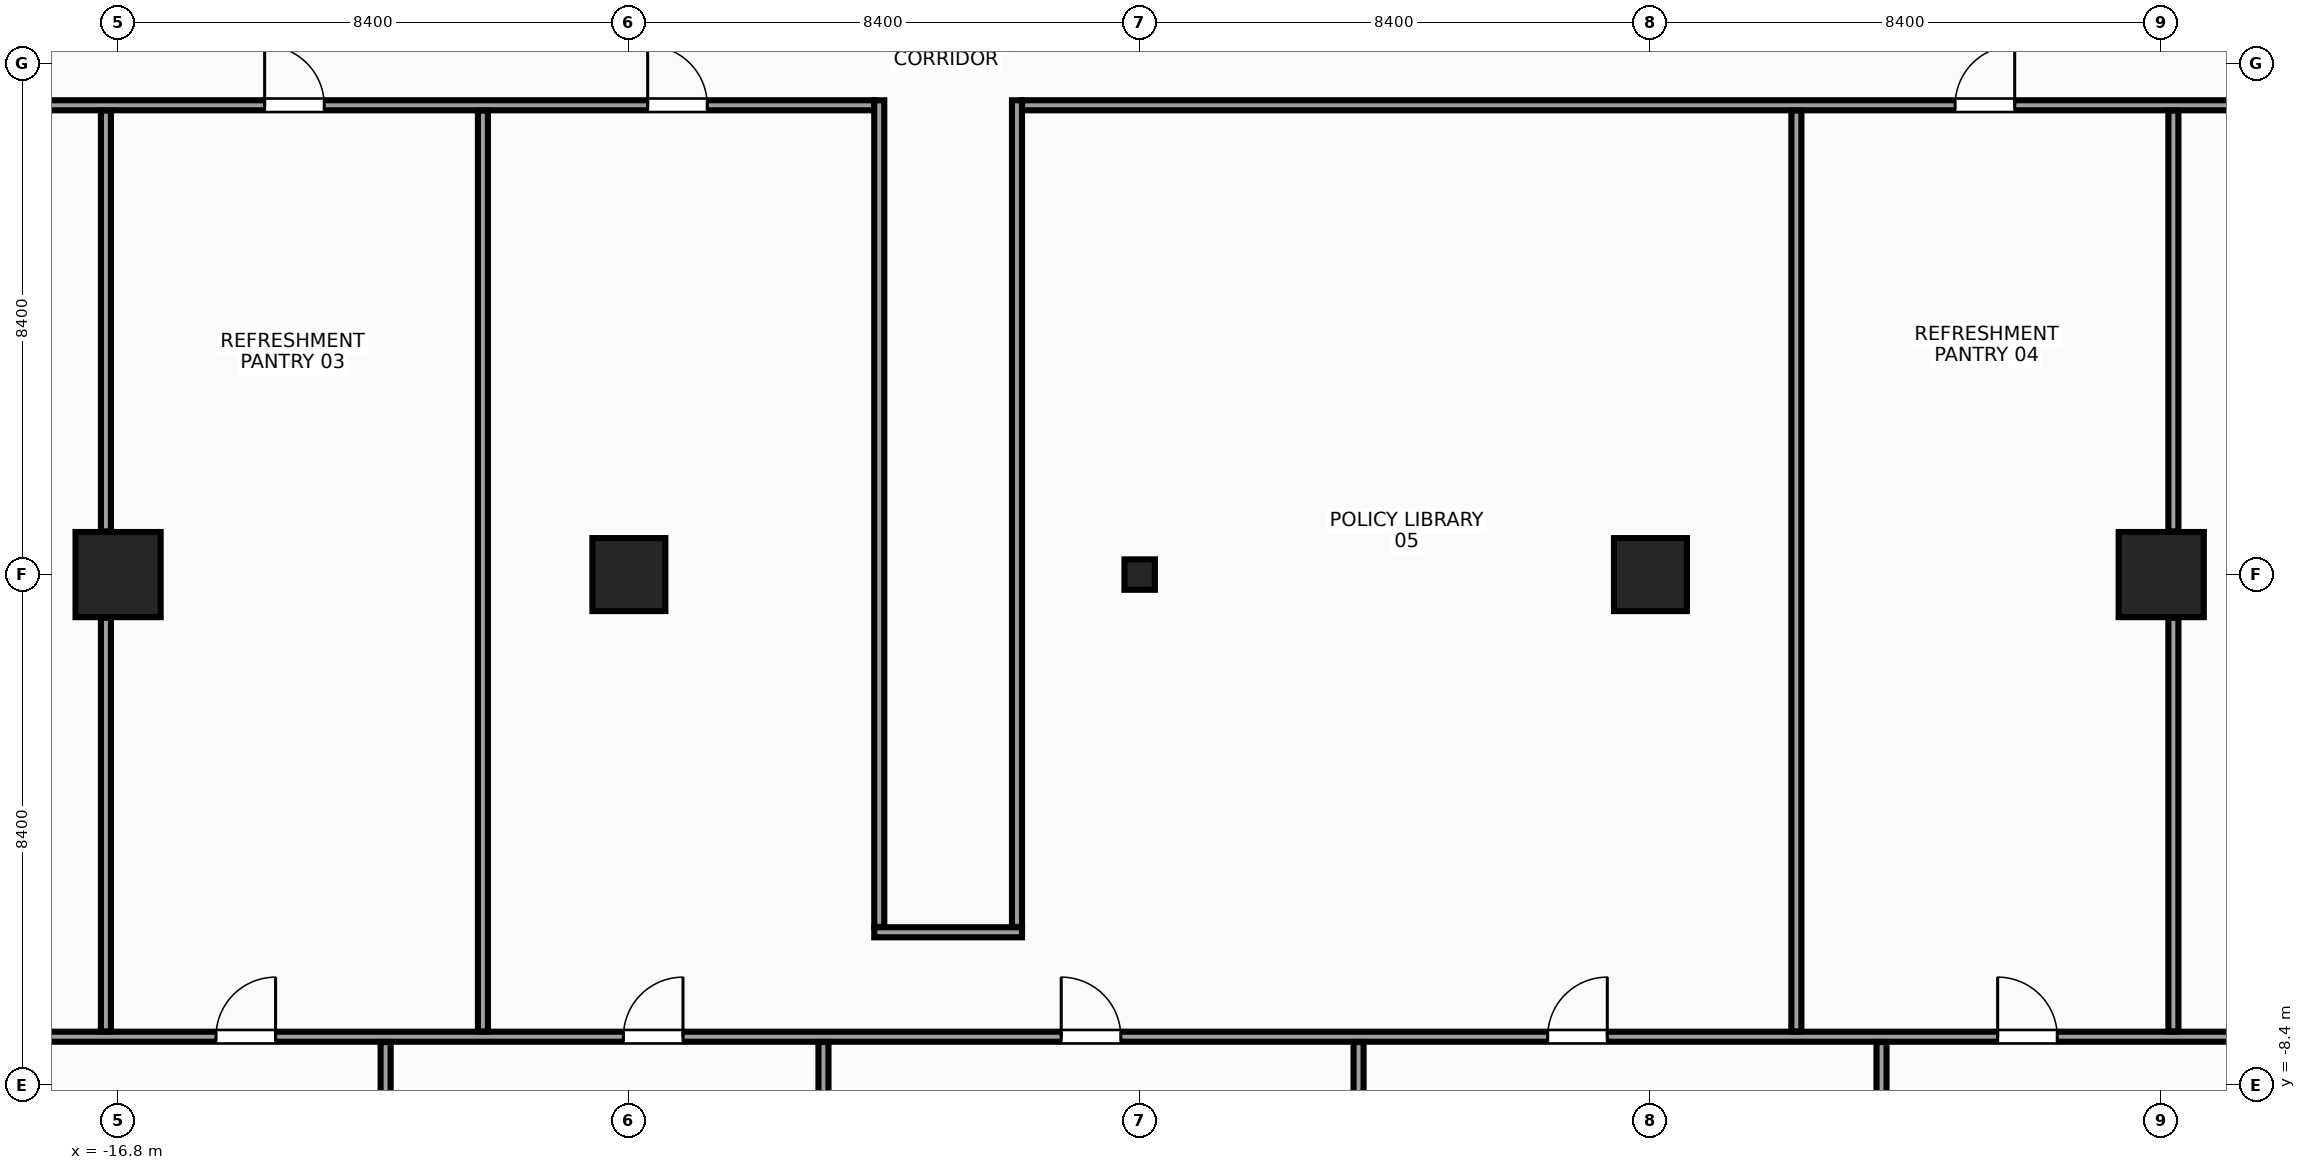
"""IFC4 building model, lengths in metres.
Left out: names, types, materials, properties, quantities, classifications, styles, units other than length and angle.
Written with IfcOpenShell. Run it as: python <this file> out.ifc"""

import sys

from ifc_helpers import new_model, si_unit, direction, frame, frame_2d, origin, origin_with_axes, origin_2d, place, context, subcontext, project, spatial, rectangle, hollow_rectangle, extrude, source, transform, mapped, element, fill, save


model = new_model("IFC4")
c1 = context("Model", 3, precision=1e-05, world=origin(), true_north=direction((0.0, 1.0)))
c2 = subcontext(c1, "Body", "Model", "MODEL_VIEW")
j1 = project(units=[si_unit("LENGTHUNIT", "METRE"), si_unit("PLANEANGLEUNIT", "RADIAN")], contexts=[c1])
p1 = place(None, origin())
s1 = spatial("IfcSite", under=j1, at=p1, CompositionType="ELEMENT")
p2 = place(p1, origin())
s2 = spatial("IfcBuilding", under=s1, at=p2, CompositionType="ELEMENT")
p3 = place(p2, frame((0.0, 0.0, 261.2)))
s3 = spatial("IfcBuildingStorey", under=s2, at=p3, CompositionType="ELEMENT", Elevation=261.2)
m1 = source(origin(), c2, "Body", "SweptSolid", [
    extrude(rectangle(XDim=1.4, YDim=1.4, at=origin_2d()), origin(), (0.0, 0.0, 1.0), 3.6),
])
for number, where, z_axis, x_axis in (
    (1, (-16.8, 0.0, 0.0), (0.0, 0.0, 1.0), (1.0, 0.0, 0.0)),
    (2, (16.8, 0.0, 0.0), (0.0, 0.0, 1.0), (1.0, 0.0, 0.0)),
):
    element("IfcColumn", number, at=place(p3, frame(where, z_axis=z_axis, x_axis=x_axis)), inside=s3, PredefinedType="COLUMN", context=c2, shape_type="MappedRepresentation", body=[
        mapped(m1, transform((0.0, 0.0, 0.0), x_axis=(1.0, 0.0, 0.0), y_axis=(0.0, 1.0, 0.0), z_axis=(0.0, 0.0, 1.0), scale=1.0)),
    ])
m2 = source(origin(), c2, "Body", "SweptSolid", [
    extrude(rectangle(XDim=1.2, YDim=1.2, at=origin_2d()), origin(), (0.0, 0.0, 1.0), 3.6),
])
for number, where, z_axis, x_axis in (
    (3, (-8.4, 0.0, 0.0), (0.0, 0.0, 1.0), (1.0, 0.0, 0.0)),
    (4, (8.4, 0.0, 0.0), (0.0, 0.0, 1.0), (1.0, 0.0, 0.0)),
):
    element("IfcColumn", number, at=place(p3, frame(where, z_axis=z_axis, x_axis=x_axis)), inside=s3, PredefinedType="COLUMN", context=c2, shape_type="MappedRepresentation", body=[
        mapped(m2, transform((0.0, 0.0, 0.0), x_axis=(1.0, 0.0, 0.0), y_axis=(0.0, 1.0, 0.0), z_axis=(0.0, 0.0, 1.0), scale=1.0)),
    ])
m3 = source(origin(), c2, "Body", "SweptSolid", [
    extrude(hollow_rectangle(XDim=0.5, YDim=0.5, WallThickness=0.025, at=origin_2d()), origin(), (0.0, 0.0, 1.0), 3.6),
])
p4 = place(p3, origin_with_axes())
e5 = element("IfcColumn", 5, at=p4, inside=s3, PredefinedType="COLUMN", context=c2, shape_type="MappedRepresentation", body=[
    mapped(m3, transform((0.0, 0.0, 0.0), x_axis=(1.0, 0.0, 0.0), y_axis=(0.0, 1.0, 0.0), z_axis=(0.0, 0.0, 1.0), scale=1.0)),
])
m4 = source(origin(), c2, "Body", "SweptSolid", [
    extrude(rectangle(XDim=15.6, YDim=0.165, at=frame_2d((7.8, 0.0))), origin(), (0.0, 0.0, 1.0), 2.755),
])
p5 = place(p3, frame((-19.965, 7.718, 0.0), z_axis=(0.0, 0.0, 1.0), x_axis=(1.0, 0.0, 0.0)))
e6 = element("IfcWall", 6, at=p5, inside=s3, PredefinedType="PARTITIONING", context=c2, shape_type="MappedRepresentation", body=[
    mapped(m4, transform((0.0, 0.0, 0.0), x_axis=(1.0, 0.0, 0.0), y_axis=(0.0, 1.0, 0.0), z_axis=(0.0, 0.0, 1.0), scale=1.0)),
])
p6 = place(p5, frame((1.014, 0.0, 0.0)))
e7 = element("IfcOpeningElement", 7, at=p6, cuts=e6, PredefinedType="OPENING", context=c2, shape_type="SweptSolid", body=[
    extrude(rectangle(XDim=0.98, YDim=2.15, at=frame_2d((0.49, 1.075))), frame((0.0, 0.094, 0.0), z_axis=(0.0, -1.0, 0.0), x_axis=(1.0, 0.0, 0.0)), (0.0, 0.0, 1.0), 0.189),
])
p7 = place(p5, frame((5.575, 0.0, 0.0)))
e8 = element("IfcOpeningElement", 8, at=p7, cuts=e6, PredefinedType="OPENING", context=c2, shape_type="SweptSolid", body=[
    extrude(rectangle(XDim=0.98, YDim=2.15, at=frame_2d((0.49, 1.075))), frame((0.0, 0.094, 0.0), z_axis=(0.0, -1.0, 0.0), x_axis=(1.0, 0.0, 0.0)), (0.0, 0.0, 1.0), 0.189),
])
p8 = place(p5, frame((11.874, 0.0, 0.0)))
e9 = element("IfcOpeningElement", 9, at=p8, cuts=e6, PredefinedType="OPENING", context=c2, shape_type="SweptSolid", body=[
    extrude(rectangle(XDim=0.98, YDim=2.15, at=frame_2d((0.49, 1.075))), frame((0.0, 0.094, 0.0), z_axis=(0.0, -1.0, 0.0), x_axis=(1.0, 0.0, 0.0)), (0.0, 0.0, 1.0), 0.189),
])
m5 = source(origin(), c2, "Body", "SweptSolid", [
    extrude(rectangle(XDim=21.9, YDim=0.165, at=frame_2d((10.95, 0.0))), origin(), (0.0, 0.0, 1.0), 2.755),
])
p9 = place(p3, frame((-1.935, 7.718, 0.0), z_axis=(0.0, 0.0, 1.0), x_axis=(1.0, 0.0, 0.0)))
e10 = element("IfcWall", 10, at=p9, inside=s3, PredefinedType="PARTITIONING", context=c2, shape_type="MappedRepresentation", body=[
    mapped(m5, transform((0.0, 0.0, 0.0), x_axis=(1.0, 0.0, 0.0), y_axis=(0.0, 1.0, 0.0), z_axis=(0.0, 0.0, 1.0), scale=1.0)),
])
p10 = place(p9, frame((19.906, 0.0, 0.0)))
e11 = element("IfcOpeningElement", 11, at=p10, cuts=e10, PredefinedType="OPENING", context=c2, shape_type="SweptSolid", body=[
    extrude(rectangle(XDim=0.98, YDim=2.15, at=frame_2d((0.49, 1.075))), frame((0.0, 0.094, 0.0), z_axis=(0.0, -1.0, 0.0), x_axis=(1.0, 0.0, 0.0)), (0.0, 0.0, 1.0), 0.189),
])
p11 = place(p9, frame((15.345, 0.0, 0.0)))
e12 = element("IfcOpeningElement", 12, at=p11, cuts=e10, PredefinedType="OPENING", context=c2, shape_type="SweptSolid", body=[
    extrude(rectangle(XDim=0.98, YDim=2.15, at=frame_2d((0.49, 1.075))), frame((0.0, 0.094, 0.0), z_axis=(0.0, -1.0, 0.0), x_axis=(1.0, 0.0, 0.0)), (0.0, 0.0, 1.0), 0.189),
])
m6 = source(origin(), c2, "Body", "SweptSolid", [
    extrude(rectangle(XDim=2.43, YDim=0.165, at=frame_2d((1.215, 0.0))), origin(), (0.0, 0.0, 1.0), 3.37),
])
p12 = place(p3, frame((-4.365, -5.883, 0.0), z_axis=(0.0, 0.0, 1.0), x_axis=(1.0, 0.0, 0.0)))
e13 = element("IfcWall", 13, at=p12, inside=s3, PredefinedType="PARTITIONING", context=c2, shape_type="MappedRepresentation", body=[
    mapped(m6, transform((0.0, 0.0, 0.0), x_axis=(1.0, 0.0, 0.0), y_axis=(0.0, 1.0, 0.0), z_axis=(0.0, 0.0, 1.0), scale=1.0)),
])
m7 = source(origin(), c2, "Body", "SweptSolid", [
    extrude(rectangle(XDim=13.595, YDim=0.165, at=frame_2d((6.797, 0.0))), origin(), (0.0, 0.0, 1.0), 2.655),
])
for number, where, z_axis, x_axis in (
    (14, (-4.282, -5.795, 0.0), (0.0, 0.0, 1.0), (0.0, 1.0, 0.0)),
    (15, (-2.018, -5.795, 0.0), (0.0, 0.0, 1.0), (0.0, 1.0, 0.0)),
):
    element("IfcWall", number, at=place(p3, frame(where, z_axis=z_axis, x_axis=x_axis)), inside=s3, PredefinedType="PARTITIONING", context=c2, shape_type="MappedRepresentation", body=[
        mapped(m7, transform((0.0, 0.0, 0.0), x_axis=(1.0, 0.0, 0.0), y_axis=(0.0, 1.0, 0.0), z_axis=(0.0, 0.0, 1.0), scale=1.0)),
    ])
m8 = source(origin(), c2, "Body", "SweptSolid", [
    extrude(rectangle(XDim=36.824, YDim=0.165, at=frame_2d((18.412, 0.0))), origin(), (0.0, 0.0, 1.0), 2.755),
])
p13 = place(p3, frame((-18.412, -7.6, 0.0), z_axis=(0.0, 0.0, 1.0), x_axis=(1.0, 0.0, 0.0)))
e16 = element("IfcWall", 16, at=p13, inside=s3, PredefinedType="PARTITIONING", context=c2, shape_type="MappedRepresentation", body=[
    mapped(m8, transform((0.0, 0.0, 0.0), x_axis=(1.0, 0.0, 0.0), y_axis=(0.0, 1.0, 0.0), z_axis=(0.0, 0.0, 1.0), scale=1.0)),
])
p14 = place(p13, frame((3.222, 0.0, 0.0)))
e17 = element("IfcOpeningElement", 17, at=p14, cuts=e16, PredefinedType="OPENING", context=c2, shape_type="SweptSolid", body=[
    extrude(rectangle(XDim=0.98, YDim=2.15, at=frame_2d((0.49, 1.075))), frame((0.0, 0.094, 0.0), z_axis=(0.0, -1.0, 0.0), x_axis=(1.0, 0.0, 0.0)), (0.0, 0.0, 1.0), 0.189),
])
p15 = place(p13, frame((32.522, 0.0, 0.0)))
e18 = element("IfcOpeningElement", 18, at=p15, cuts=e16, PredefinedType="OPENING", context=c2, shape_type="SweptSolid", body=[
    extrude(rectangle(XDim=0.98, YDim=2.15, at=frame_2d((0.49, 1.075))), frame((0.0, 0.094, 0.0), z_axis=(0.0, -1.0, 0.0), x_axis=(1.0, 0.0, 0.0)), (0.0, 0.0, 1.0), 0.189),
])
p16 = place(p13, frame((9.922, 0.0, 0.0)))
e19 = element("IfcOpeningElement", 19, at=p16, cuts=e16, PredefinedType="OPENING", context=c2, shape_type="SweptSolid", body=[
    extrude(rectangle(XDim=0.98, YDim=2.15, at=frame_2d((0.49, 1.075))), frame((0.0, 0.094, 0.0), z_axis=(0.0, -1.0, 0.0), x_axis=(1.0, 0.0, 0.0)), (0.0, 0.0, 1.0), 0.189),
])
p17 = place(p13, frame((17.122, 0.0, 0.0)))
e20 = element("IfcOpeningElement", 20, at=p17, cuts=e16, PredefinedType="OPENING", context=c2, shape_type="SweptSolid", body=[
    extrude(rectangle(XDim=0.98, YDim=2.15, at=frame_2d((0.49, 1.075))), frame((0.0, 0.094, 0.0), z_axis=(0.0, -1.0, 0.0), x_axis=(1.0, 0.0, 0.0)), (0.0, 0.0, 1.0), 0.189),
])
p18 = place(p13, frame((25.122, 0.0, 0.0)))
e21 = element("IfcOpeningElement", 21, at=p18, cuts=e16, PredefinedType="OPENING", context=c2, shape_type="SweptSolid", body=[
    extrude(rectangle(XDim=0.98, YDim=2.15, at=frame_2d((0.49, 1.075))), frame((0.0, 0.094, 0.0), z_axis=(0.0, -1.0, 0.0), x_axis=(1.0, 0.0, 0.0)), (0.0, 0.0, 1.0), 0.189),
])
m9 = source(origin(), c2, "Body", "SweptSolid", [
    extrude(rectangle(XDim=6.802, YDim=0.165, at=frame_2d((3.401, 0.0))), origin(), (0.0, 0.0, 1.0), 2.755),
])
p19 = place(p3, frame((-17.0, -7.512, 0.0), z_axis=(0.0, 0.0, 1.0), x_axis=(0.0, 1.0, 0.0)))
e22 = element("IfcWall", 22, at=p19, inside=s3, PredefinedType="PARTITIONING", context=c2, shape_type="MappedRepresentation", body=[
    mapped(m9, transform((0.0, 0.0, 0.0), x_axis=(1.0, 0.0, 0.0), y_axis=(0.0, 1.0, 0.0), z_axis=(0.0, 0.0, 1.0), scale=1.0)),
])
m10 = source(origin(), c2, "Body", "SweptSolid", [
    extrude(rectangle(XDim=6.92, YDim=0.165, at=frame_2d((3.46, 0.0))), origin(), (0.0, 0.0, 1.0), 2.755),
])
p20 = place(p3, frame((-17.0, 0.71, 0.0), z_axis=(0.0, 0.0, 1.0), x_axis=(0.0, 1.0, 0.0)))
e23 = element("IfcWall", 23, at=p20, inside=s3, PredefinedType="PARTITIONING", context=c2, shape_type="MappedRepresentation", body=[
    mapped(m10, transform((0.0, 0.0, 0.0), x_axis=(1.0, 0.0, 0.0), y_axis=(0.0, 1.0, 0.0), z_axis=(0.0, 0.0, 1.0), scale=1.0)),
])
m11 = source(origin(), c2, "Body", "SweptSolid", [
    extrude(rectangle(XDim=15.142, YDim=0.165, at=frame_2d((7.571, 0.0))), origin(), (0.0, 0.0, 1.0), 2.655),
])
for number, where, z_axis, x_axis in (
    (24, (-10.8, -7.512, 0.0), (0.0, 0.0, 1.0), (0.0, 1.0, 0.0)),
    (25, (10.8, -7.512, 0.0), (0.0, 0.0, 1.0), (0.0, 1.0, 0.0)),
):
    element("IfcWall", number, at=place(p3, frame(where, z_axis=z_axis, x_axis=x_axis)), inside=s3, PredefinedType="PARTITIONING", context=c2, shape_type="MappedRepresentation", body=[
        mapped(m11, transform((0.0, 0.0, 0.0), x_axis=(1.0, 0.0, 0.0), y_axis=(0.0, 1.0, 0.0), z_axis=(0.0, 0.0, 1.0), scale=1.0)),
    ])
p21 = place(p3, frame((17.0, -7.512, 0.0), z_axis=(0.0, 0.0, 1.0), x_axis=(0.0, 1.0, 0.0)))
e26 = element("IfcWall", 26, at=p21, inside=s3, PredefinedType="PARTITIONING", context=c2, shape_type="MappedRepresentation", body=[
    mapped(m9, transform((0.0, 0.0, 0.0), x_axis=(1.0, 0.0, 0.0), y_axis=(0.0, 1.0, 0.0), z_axis=(0.0, 0.0, 1.0), scale=1.0)),
])
p22 = place(p3, frame((17.0, 0.71, 0.0), z_axis=(0.0, 0.0, 1.0), x_axis=(0.0, 1.0, 0.0)))
e27 = element("IfcWall", 27, at=p22, inside=s3, PredefinedType="PARTITIONING", context=c2, shape_type="MappedRepresentation", body=[
    mapped(m10, transform((0.0, 0.0, 0.0), x_axis=(1.0, 0.0, 0.0), y_axis=(0.0, 1.0, 0.0), z_axis=(0.0, 0.0, 1.0), scale=1.0)),
])
m12 = source(origin(), c2, "Body", "SweptSolid", [
    extrude(rectangle(XDim=4.163, YDim=0.165, at=frame_2d((2.081, 0.0))), origin(), (0.0, 0.0, 1.0), 2.905),
])
for number, where, z_axis, x_axis in (
    (28, (-12.4, -11.85, 0.0), (0.0, 0.0, 1.0), (0.0, 1.0, 0.0)),
    (29, (-5.2, -11.85, 0.0), (0.0, 0.0, 1.0), (0.0, 1.0, 0.0)),
    (30, (3.6, -11.85, 0.0), (0.0, 0.0, 1.0), (0.0, 1.0, 0.0)),
    (31, (12.2, -11.85, 0.0), (0.0, 0.0, 1.0), (0.0, 1.0, 0.0)),
):
    element("IfcWall", number, at=place(p3, frame(where, z_axis=z_axis, x_axis=x_axis)), inside=s3, PredefinedType="PARTITIONING", context=c2, shape_type="MappedRepresentation", body=[
        mapped(m12, transform((0.0, 0.0, 0.0), x_axis=(1.0, 0.0, 0.0), y_axis=(0.0, 1.0, 0.0), z_axis=(0.0, 0.0, 1.0), scale=1.0)),
    ])
m13 = source(origin(), c2, "Body", "SweptSolid", [
    extrude(rectangle(XDim=0.98, YDim=2.15, at=frame_2d((0.49, 1.075))), frame((0.0, 0.025, 0.0), z_axis=(0.0, -1.0, 0.0), x_axis=(1.0, 0.0, 0.0)), (0.0, 0.0, 1.0), 0.05),
])
p23 = place(p7, origin())
e32 = element("IfcDoor", 32, at=p23, inside=s3, OperationType="SINGLE_SWING_LEFT", PredefinedType="DOOR", context=c2, shape_type="MappedRepresentation", body=[
    mapped(m13, transform((0.0, 0.0, 0.0), x_axis=(1.0, 0.0, 0.0), y_axis=(0.0, 1.0, 0.0), z_axis=(0.0, 0.0, 1.0), scale=1.0)),
])
fill(e8, e32)
p24 = place(p11, origin())
e33 = element("IfcDoor", 33, at=p24, inside=s3, OperationType="SINGLE_SWING_RIGHT", PredefinedType="DOOR", context=c2, shape_type="MappedRepresentation", body=[
    mapped(m13, transform((0.0, 0.0, 0.0), x_axis=(1.0, 0.0, 0.0), y_axis=(0.0, 1.0, 0.0), z_axis=(0.0, 0.0, 1.0), scale=1.0)),
])
fill(e12, e33)
p25 = place(p8, origin())
e34 = element("IfcDoor", 34, at=p25, inside=s3, OperationType="SINGLE_SWING_LEFT", PredefinedType="DOOR", context=c2, shape_type="MappedRepresentation", body=[
    mapped(m13, transform((0.0, 0.0, 0.0), x_axis=(1.0, 0.0, 0.0), y_axis=(0.0, 1.0, 0.0), z_axis=(0.0, 0.0, 1.0), scale=1.0)),
])
fill(e9, e34)
p26 = place(p14, origin())
e35 = element("IfcDoor", 35, at=p26, inside=s3, OperationType="SINGLE_SWING_RIGHT", PredefinedType="DOOR", context=c2, shape_type="MappedRepresentation", body=[
    mapped(m13, transform((0.0, 0.0, 0.0), x_axis=(1.0, 0.0, 0.0), y_axis=(0.0, 1.0, 0.0), z_axis=(0.0, 0.0, 1.0), scale=1.0)),
])
fill(e17, e35)
p27 = place(p15, origin())
e36 = element("IfcDoor", 36, at=p27, inside=s3, OperationType="SINGLE_SWING_LEFT", PredefinedType="DOOR", context=c2, shape_type="MappedRepresentation", body=[
    mapped(m13, transform((0.0, 0.0, 0.0), x_axis=(1.0, 0.0, 0.0), y_axis=(0.0, 1.0, 0.0), z_axis=(0.0, 0.0, 1.0), scale=1.0)),
])
fill(e18, e36)
p28 = place(p16, origin())
e37 = element("IfcDoor", 37, at=p28, inside=s3, OperationType="SINGLE_SWING_RIGHT", PredefinedType="DOOR", context=c2, shape_type="MappedRepresentation", body=[
    mapped(m13, transform((0.0, 0.0, 0.0), x_axis=(1.0, 0.0, 0.0), y_axis=(0.0, 1.0, 0.0), z_axis=(0.0, 0.0, 1.0), scale=1.0)),
])
fill(e19, e37)
p29 = place(p17, origin())
e38 = element("IfcDoor", 38, at=p29, inside=s3, OperationType="SINGLE_SWING_LEFT", PredefinedType="DOOR", context=c2, shape_type="MappedRepresentation", body=[
    mapped(m13, transform((0.0, 0.0, 0.0), x_axis=(1.0, 0.0, 0.0), y_axis=(0.0, 1.0, 0.0), z_axis=(0.0, 0.0, 1.0), scale=1.0)),
])
fill(e20, e38)
p30 = place(p18, origin())
e39 = element("IfcDoor", 39, at=p30, inside=s3, OperationType="SINGLE_SWING_RIGHT", PredefinedType="DOOR", context=c2, shape_type="MappedRepresentation", body=[
    mapped(m13, transform((0.0, 0.0, 0.0), x_axis=(1.0, 0.0, 0.0), y_axis=(0.0, 1.0, 0.0), z_axis=(0.0, 0.0, 1.0), scale=1.0)),
])
fill(e21, e39)
save(model, sys.argv[1])
